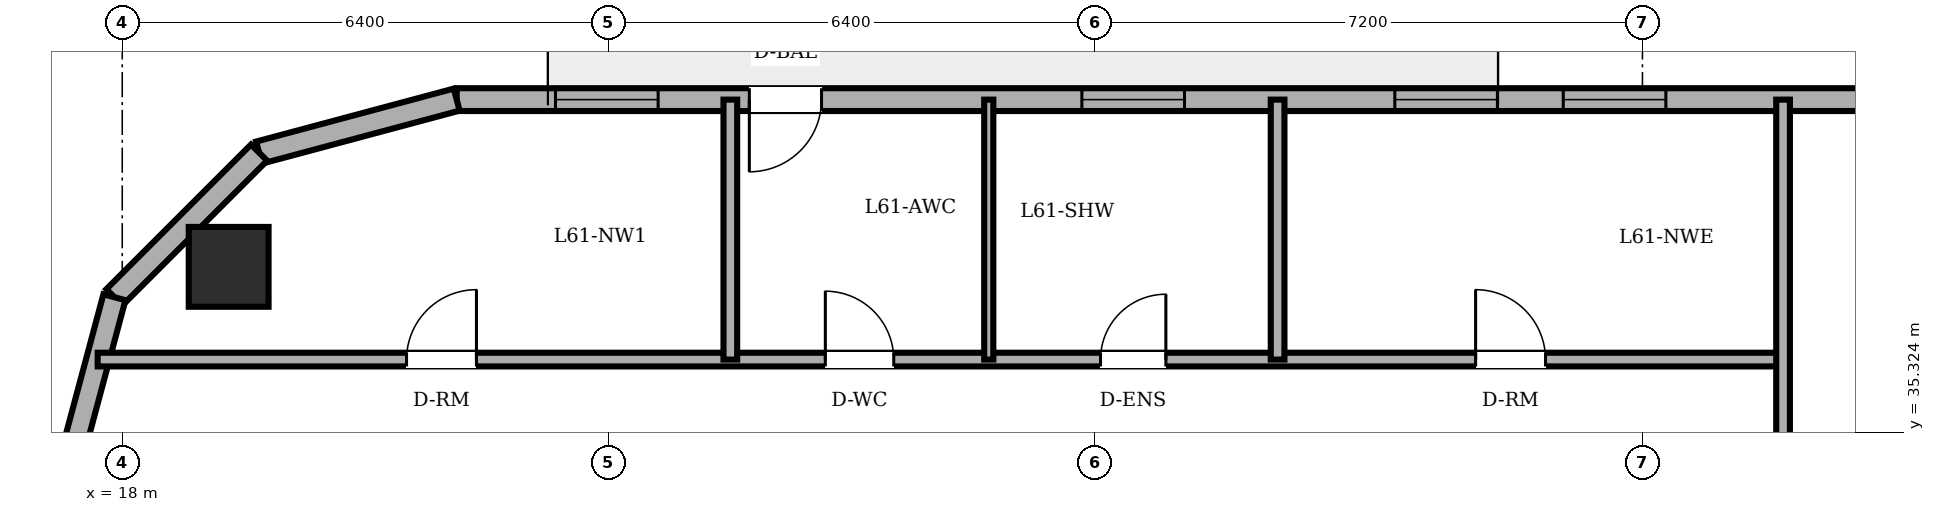
"""IFC4 building model, lengths in metres.
Left out: names, types, materials, properties, quantities, classifications, styles, units other than length and angle.
Written with IfcOpenShell. Run it as: python <this file> out.ifc"""

import sys

from ifc_helpers import new_model, si_unit, direction, frame, frame_2d, origin, origin_2d, place, context, subcontext, project, spatial, rectangle, circle, extrude, element, fill, save


model = new_model("IFC4")
c1 = context("Model", 3, precision=1e-05, world=origin(), true_north=direction((0.0, 1.0)))
c2 = subcontext(c1, "Body", "Model", "MODEL_VIEW")
j1 = project(units=[si_unit("LENGTHUNIT", "METRE"), si_unit("PLANEANGLEUNIT", "RADIAN")], contexts=[c1])
p1 = place(None, origin())
s1 = spatial("IfcSite", under=j1, at=p1, CompositionType="ELEMENT")
p2 = place(p1, origin())
s2 = spatial("IfcBuilding", under=s1, at=p2, CompositionType="ELEMENT")
p3 = place(p2, frame((0.0, 0.0, 233.7)))
s3 = spatial("IfcBuildingStorey", under=s2, at=p3, CompositionType="ELEMENT", Elevation=233.7)
p4 = place(p3, frame((19.4, 37.5, 0.0), z_axis=(0.0, 0.0, 1.0), x_axis=(1.0, 0.0, 0.0)))
e1 = element("IfcColumn", 1, at=p4, inside=s3, PredefinedType="COLUMN", context=c2, shape_type="SweptSolid", body=[
    extrude(circle(Radius=0.525, at=origin_2d()), origin(), (0.0, 0.0, 1.0), 3.6),
])
p5 = place(p3, frame((54.885, 39.7, 0.0), z_axis=(0.0, 0.0, 1.0), x_axis=(-1.0, 0.0, 0.0)))
e2 = element("IfcWall", 2, at=p5, inside=s3, PredefinedType="SOLIDWALL", context=c2, shape_type="SweptSolid", body=[
    extrude(rectangle(XDim=32.485, YDim=0.3, at=frame_2d((16.243, 0.0))), origin(), (0.0, 0.0, 1.0), 3.4),
])
p6 = place(p5, frame((27.685, 0.0, 0.0)))
e3 = element("IfcOpeningElement", 3, at=p6, cuts=e2, PredefinedType="OPENING", context=c2, shape_type="SweptSolid", body=[
    extrude(rectangle(XDim=0.95, YDim=2.2, at=frame_2d((0.475, 1.1))), frame((0.0, 0.16, 0.0), z_axis=(0.0, -1.0, 0.0), x_axis=(1.0, 0.0, 0.0)), (0.0, 0.0, 1.0), 0.32),
])
p7 = place(p5, frame((4.57, 0.0, 0.85)))
e4 = element("IfcOpeningElement", 4, at=p7, cuts=e2, PredefinedType="OPENING", context=c2, shape_type="SweptSolid", body=[
    extrude(rectangle(XDim=1.35, YDim=1.55, at=frame_2d((0.675, 0.775))), frame((0.0, 0.16, 0.0), z_axis=(0.0, -1.0, 0.0), x_axis=(1.0, 0.0, 0.0)), (0.0, 0.0, 1.0), 0.32),
])
p8 = place(p5, frame((9.465, 0.0, 0.85)))
e5 = element("IfcOpeningElement", 5, at=p8, cuts=e2, PredefinedType="OPENING", context=c2, shape_type="SweptSolid", body=[
    extrude(rectangle(XDim=1.35, YDim=1.55, at=frame_2d((0.675, 0.775))), frame((0.0, 0.16, 0.0), z_axis=(0.0, -1.0, 0.0), x_axis=(1.0, 0.0, 0.0)), (0.0, 0.0, 1.0), 0.32),
])
p9 = place(p5, frame((16.577, 0.0, 0.85)))
e6 = element("IfcOpeningElement", 6, at=p9, cuts=e2, PredefinedType="OPENING", context=c2, shape_type="SweptSolid", body=[
    extrude(rectangle(XDim=1.35, YDim=1.55, at=frame_2d((0.675, 0.775))), frame((0.0, 0.16, 0.0), z_axis=(0.0, -1.0, 0.0), x_axis=(1.0, 0.0, 0.0)), (0.0, 0.0, 1.0), 0.32),
])
p10 = place(p5, frame((18.793, 0.0, 0.85)))
e7 = element("IfcOpeningElement", 7, at=p10, cuts=e2, PredefinedType="OPENING", context=c2, shape_type="SweptSolid", body=[
    extrude(rectangle(XDim=1.35, YDim=1.55, at=frame_2d((0.675, 0.775))), frame((0.0, 0.16, 0.0), z_axis=(0.0, -1.0, 0.0), x_axis=(1.0, 0.0, 0.0)), (0.0, 0.0, 1.0), 0.32),
])
p11 = place(p5, frame((22.91, 0.0, 0.85)))
e8 = element("IfcOpeningElement", 8, at=p11, cuts=e2, PredefinedType="OPENING", context=c2, shape_type="SweptSolid", body=[
    extrude(rectangle(XDim=1.35, YDim=1.55, at=frame_2d((0.675, 0.775))), frame((0.0, 0.16, 0.0), z_axis=(0.0, -1.0, 0.0), x_axis=(1.0, 0.0, 0.0)), (0.0, 0.0, 1.0), 0.32),
])
p12 = place(p5, frame((29.835, 0.0, 0.85)))
e9 = element("IfcOpeningElement", 9, at=p12, cuts=e2, PredefinedType="OPENING", context=c2, shape_type="SweptSolid", body=[
    extrude(rectangle(XDim=1.35, YDim=1.55, at=frame_2d((0.675, 0.775))), frame((0.0, 0.16, 0.0), z_axis=(0.0, -1.0, 0.0), x_axis=(1.0, 0.0, 0.0)), (0.0, 0.0, 1.0), 0.32),
])
p13 = place(p3, frame((22.4, 39.7, 0.0), z_axis=(0.0, 0.0, 1.0), x_axis=(-0.965889330541, -0.258955210695, 0.0)))
e10 = element("IfcWall", 10, at=p13, inside=s3, PredefinedType="SOLIDWALL", context=c2, shape_type="SweptSolid", body=[
    extrude(rectangle(XDim=2.692, YDim=0.3, at=frame_2d((1.346, 0.0))), origin(), (0.0, 0.0, 1.0), 3.4),
])
p14 = place(p3, frame((19.8, 39.003, 0.0), z_axis=(0.0, 0.0, 1.0), x_axis=(-0.707152139074, -0.70706142039, 0.0)))
e11 = element("IfcWall", 11, at=p14, inside=s3, PredefinedType="SOLIDWALL", context=c2, shape_type="SweptSolid", body=[
    extrude(rectangle(XDim=2.691, YDim=0.3, at=frame_2d((1.346, 0.0))), origin(), (0.0, 0.0, 1.0), 3.4),
])
p15 = place(p3, frame((17.897, 37.1, 0.0), z_axis=(0.0, 0.0, 1.0), x_axis=(-0.258932525951, -0.965895412042, 0.0)))
e12 = element("IfcWall", 12, at=p15, inside=s3, PredefinedType="SOLIDWALL", context=c2, shape_type="SweptSolid", body=[
    extrude(rectangle(XDim=2.692, YDim=0.3, at=frame_2d((1.346, 0.0))), origin(), (0.0, 0.0, 1.0), 3.4),
])
p16 = place(p3, frame((17.677, 36.28, 0.0), z_axis=(0.0, 0.0, 1.0), x_axis=(1.0, 0.0, 0.0)))
e13 = element("IfcWall", 13, at=p16, inside=s3, PredefinedType="PARTITIONING", context=c2, shape_type="SweptSolid", body=[
    extrude(rectangle(XDim=22.173, YDim=0.18, at=frame_2d((11.086, 0.0))), origin(), (0.0, 0.0, 1.0), 3.4),
])
p17 = place(p16, frame((9.573, 0.0, 0.0)))
e14 = element("IfcOpeningElement", 14, at=p17, cuts=e13, PredefinedType="OPENING", context=c2, shape_type="SweptSolid", body=[
    extrude(rectangle(XDim=0.9, YDim=2.1, at=frame_2d((0.45, 1.05))), frame((0.0, 0.1, 0.0), z_axis=(0.0, -1.0, 0.0), x_axis=(1.0, 0.0, 0.0)), (0.0, 0.0, 1.0), 0.2),
])
p18 = place(p16, frame((13.193, 0.0, 0.0)))
e15 = element("IfcOpeningElement", 15, at=p18, cuts=e13, PredefinedType="OPENING", context=c2, shape_type="SweptSolid", body=[
    extrude(rectangle(XDim=0.86, YDim=2.1, at=frame_2d((0.43, 1.05))), frame((0.0, 0.1, 0.0), z_axis=(0.0, -1.0, 0.0), x_axis=(1.0, 0.0, 0.0)), (0.0, 0.0, 1.0), 0.2),
])
p19 = place(p16, frame((4.063, 0.0, 0.0)))
e16 = element("IfcOpeningElement", 16, at=p19, cuts=e13, PredefinedType="OPENING", context=c2, shape_type="SweptSolid", body=[
    extrude(rectangle(XDim=0.92, YDim=2.1, at=frame_2d((0.46, 1.05))), frame((0.0, 0.1, 0.0), z_axis=(0.0, -1.0, 0.0), x_axis=(1.0, 0.0, 0.0)), (0.0, 0.0, 1.0), 0.2),
])
p20 = place(p16, frame((18.128, 0.0, 0.0)))
e17 = element("IfcOpeningElement", 17, at=p20, cuts=e13, PredefinedType="OPENING", context=c2, shape_type="SweptSolid", body=[
    extrude(rectangle(XDim=0.92, YDim=2.1, at=frame_2d((0.46, 1.05))), frame((0.0, 0.1, 0.0), z_axis=(0.0, -1.0, 0.0), x_axis=(1.0, 0.0, 0.0)), (0.0, 0.0, 1.0), 0.2),
])
p21 = place(p3, frame((26.0, 36.28, 0.0), z_axis=(0.0, 0.0, 1.0), x_axis=(0.0, 1.0, 0.0)))
e18 = element("IfcWall", 18, at=p21, inside=s3, PredefinedType="PARTITIONING", context=c2, shape_type="SweptSolid", body=[
    extrude(rectangle(XDim=3.42, YDim=0.18, at=frame_2d((1.71, 0.0))), origin(), (0.0, 0.0, 1.0), 3.4),
])
p22 = place(p3, frame((29.4, 36.28, 0.0), z_axis=(0.0, 0.0, 1.0), x_axis=(0.0, 1.0, 0.0)))
e19 = element("IfcWall", 19, at=p22, inside=s3, PredefinedType="PARTITIONING", context=c2, shape_type="SweptSolid", body=[
    extrude(rectangle(XDim=3.42, YDim=0.12, at=frame_2d((1.71, 0.0))), origin(), (0.0, 0.0, 1.0), 3.4),
])
p23 = place(p3, frame((33.2, 36.28, 0.0), z_axis=(0.0, 0.0, 1.0), x_axis=(0.0, 1.0, 0.0)))
e20 = element("IfcWall", 20, at=p23, inside=s3, PredefinedType="PARTITIONING", context=c2, shape_type="SweptSolid", body=[
    extrude(rectangle(XDim=3.42, YDim=0.18, at=frame_2d((1.71, 0.0))), origin(), (0.0, 0.0, 1.0), 3.4),
])
p24 = place(p3, frame((39.85, 25.18, 0.0), z_axis=(0.0, 0.0, 1.0), x_axis=(0.0, 1.0, 0.0)))
e21 = element("IfcWall", 21, at=p24, inside=s3, PredefinedType="PARTITIONING", context=c2, shape_type="SweptSolid", body=[
    extrude(rectangle(XDim=14.52, YDim=0.18, at=frame_2d((7.26, 0.0))), origin(), (0.0, 0.0, 1.0), 3.4),
])
p25 = place(p6, origin())
e22 = element("IfcDoor", 22, at=p25, inside=s3, OperationType="SINGLE_SWING_RIGHT", PredefinedType="DOOR", context=c2, shape_type="SweptSolid", body=[
    extrude(rectangle(XDim=0.95, YDim=2.2, at=frame_2d((0.475, 1.1))), frame((0.0, 0.025, 0.0), z_axis=(0.0, -1.0, 0.0), x_axis=(1.0, 0.0, 0.0)), (0.0, 0.0, 1.0), 0.05),
])
fill(e3, e22)
p26 = place(p9, origin())
e23 = element("IfcWindow", 23, at=p26, inside=s3, PartitioningType="SINGLE_PANEL", PredefinedType="WINDOW", context=c2, shape_type="SweptSolid", body=[
    extrude(rectangle(XDim=1.35, YDim=1.55, at=frame_2d((0.675, 0.775))), frame((0.0, 0.03, 0.0), z_axis=(0.0, -1.0, 0.0), x_axis=(1.0, 0.0, 0.0)), (0.0, 0.0, 1.0), 0.06),
])
fill(e6, e23)
p27 = place(p10, origin())
e24 = element("IfcWindow", 24, at=p27, inside=s3, PartitioningType="SINGLE_PANEL", PredefinedType="WINDOW", context=c2, shape_type="SweptSolid", body=[
    extrude(rectangle(XDim=1.35, YDim=1.55, at=frame_2d((0.675, 0.775))), frame((0.0, 0.03, 0.0), z_axis=(0.0, -1.0, 0.0), x_axis=(1.0, 0.0, 0.0)), (0.0, 0.0, 1.0), 0.06),
])
fill(e7, e24)
p28 = place(p11, origin())
e25 = element("IfcWindow", 25, at=p28, inside=s3, PartitioningType="SINGLE_PANEL", PredefinedType="WINDOW", context=c2, shape_type="SweptSolid", body=[
    extrude(rectangle(XDim=1.35, YDim=1.55, at=frame_2d((0.675, 0.775))), frame((0.0, 0.03, 0.0), z_axis=(0.0, -1.0, 0.0), x_axis=(1.0, 0.0, 0.0)), (0.0, 0.0, 1.0), 0.06),
])
fill(e8, e25)
p29 = place(p12, origin())
e26 = element("IfcWindow", 26, at=p29, inside=s3, PartitioningType="SINGLE_PANEL", PredefinedType="WINDOW", context=c2, shape_type="SweptSolid", body=[
    extrude(rectangle(XDim=1.35, YDim=1.55, at=frame_2d((0.675, 0.775))), frame((0.0, 0.03, 0.0), z_axis=(0.0, -1.0, 0.0), x_axis=(1.0, 0.0, 0.0)), (0.0, 0.0, 1.0), 0.06),
])
fill(e9, e26)
p30 = place(p17, origin())
e27 = element("IfcDoor", 27, at=p30, inside=s3, OperationType="SINGLE_SWING_LEFT", PredefinedType="DOOR", context=c2, shape_type="SweptSolid", body=[
    extrude(rectangle(XDim=0.9, YDim=2.1, at=frame_2d((0.45, 1.05))), frame((0.0, 0.025, 0.0), z_axis=(0.0, -1.0, 0.0), x_axis=(1.0, 0.0, 0.0)), (0.0, 0.0, 1.0), 0.05),
])
fill(e14, e27)
p31 = place(p18, origin())
e28 = element("IfcDoor", 28, at=p31, inside=s3, OperationType="SINGLE_SWING_RIGHT", PredefinedType="DOOR", context=c2, shape_type="SweptSolid", body=[
    extrude(rectangle(XDim=0.86, YDim=2.1, at=frame_2d((0.43, 1.05))), frame((0.0, 0.025, 0.0), z_axis=(0.0, -1.0, 0.0), x_axis=(1.0, 0.0, 0.0)), (0.0, 0.0, 1.0), 0.05),
])
fill(e15, e28)
p32 = place(p19, origin())
e29 = element("IfcDoor", 29, at=p32, inside=s3, OperationType="SINGLE_SWING_RIGHT", PredefinedType="DOOR", context=c2, shape_type="SweptSolid", body=[
    extrude(rectangle(XDim=0.92, YDim=2.1, at=frame_2d((0.46, 1.05))), frame((0.0, 0.025, 0.0), z_axis=(0.0, -1.0, 0.0), x_axis=(1.0, 0.0, 0.0)), (0.0, 0.0, 1.0), 0.05),
])
fill(e16, e29)
p33 = place(p20, origin())
e30 = element("IfcDoor", 30, at=p33, inside=s3, OperationType="SINGLE_SWING_LEFT", PredefinedType="DOOR", context=c2, shape_type="SweptSolid", body=[
    extrude(rectangle(XDim=0.92, YDim=2.1, at=frame_2d((0.46, 1.05))), frame((0.0, 0.025, 0.0), z_axis=(0.0, -1.0, 0.0), x_axis=(1.0, 0.0, 0.0)), (0.0, 0.0, 1.0), 0.05),
])
fill(e17, e30)
save(model, sys.argv[1])
